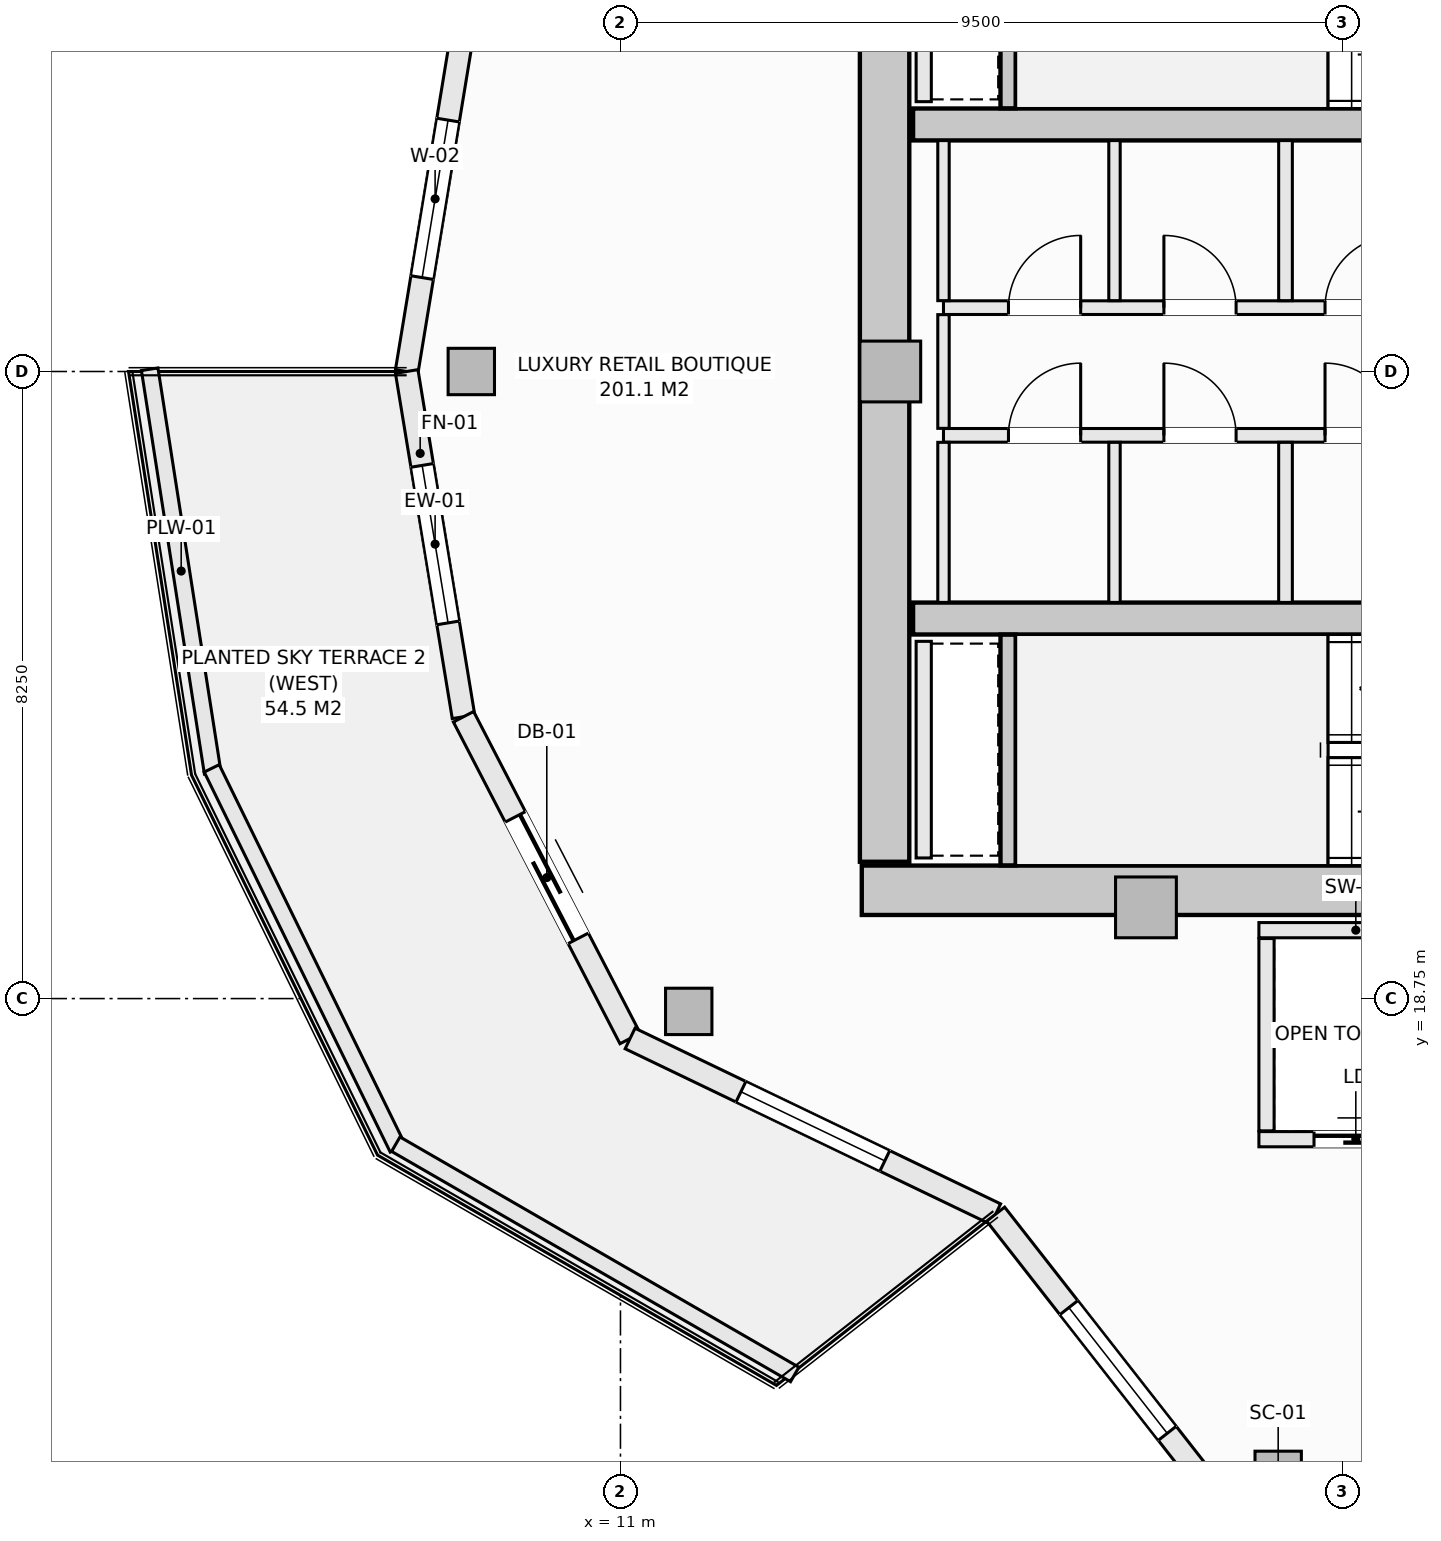
"""IFC4 building model, lengths in metres.
Left out: names, types, materials, properties, quantities, classifications, styles, units other than length and angle.
Written with IfcOpenShell. Run it as: python <this file> out.ifc"""

import sys

from ifc_helpers import new_model, si_unit, direction, frame, frame_2d, origin, origin_2d, place, context, subcontext, project, spatial, rectangle, hollow_rectangle, extrude, element, fill, save


model = new_model("IFC4")
c1 = context("Model", 3, precision=1e-05, world=origin(), true_north=direction((0.0, 1.0)))
c2 = subcontext(c1, "Body", "Model", "MODEL_VIEW")
j1 = project(units=[si_unit("LENGTHUNIT", "METRE"), si_unit("PLANEANGLEUNIT", "RADIAN")], contexts=[c1])
p1 = place(None, origin())
s1 = spatial("IfcSite", under=j1, at=p1, CompositionType="ELEMENT")
p2 = place(p1, origin())
s2 = spatial("IfcBuilding", under=s1, at=p2, CompositionType="ELEMENT")
p3 = place(p2, frame((0.0, 0.0, 173.3)))
s3 = spatial("IfcBuildingStorey", under=s2, at=p3, CompositionType="ELEMENT", Elevation=173.3)
p4 = place(p3, frame((14.175, 20.175, -0.27), z_axis=(0.0, 0.0, 1.0), x_axis=(1.0, 0.0, 0.0)))
e1 = element("IfcWall", 1, at=p4, inside=s3, PredefinedType="SHEAR", context=c2, shape_type="SweptSolid", body=[
    extrude(rectangle(XDim=13.65, YDim=0.65, at=frame_2d((6.825, 0.0))), origin(), (0.0, 0.0, 1.0), 3.4),
])
p5 = place(p3, frame((14.475, 20.55, -0.27), z_axis=(0.0, 0.0, 1.0), x_axis=(0.0, 1.0, 0.0)))
e2 = element("IfcWall", 2, at=p5, inside=s3, PredefinedType="SHEAR", context=c2, shape_type="SweptSolid", body=[
    extrude(rectangle(XDim=12.9, YDim=0.65, at=frame_2d((6.45, 0.0))), origin(), (0.0, 0.0, 1.0), 3.4),
])
for number, where, z_axis, x_axis in (
    (3, (14.85, 30.25, -0.27), (0.0, 0.0, 1.0), (1.0, 0.0, 0.0)),
    (4, (14.85, 23.75, -0.27), (0.0, 0.0, 1.0), (1.0, 0.0, 0.0)),
):
    element("IfcWall", number, at=place(p3, frame(where, z_axis=z_axis, x_axis=x_axis)), inside=s3, PredefinedType="SHEAR", context=c2, shape_type="SweptSolid", body=[
        extrude(rectangle(XDim=7.3, YDim=0.42, at=frame_2d((3.65, 0.0))), origin(), (0.0, 0.0, 1.0), 3.4),
    ])
for number, where, z_axis, x_axis in (
    (5, (9.038, 27.0, -0.27), (0.0, 0.0, 1.0), (1.0, 0.0, 0.0)),
    (6, (11.898, 18.581, -0.27), (0.0, 0.0, 1.0), (1.0, 0.0, 0.0)),
    (7, (19.654, 12.49, -0.27), (0.0, 0.0, 1.0), (1.0, 0.0, 0.0)),
):
    element("IfcColumn", number, at=place(p3, frame(where, z_axis=z_axis, x_axis=x_axis)), inside=s3, PredefinedType="COLUMN", context=c2, shape_type="SweptSolid", body=[
        extrude(hollow_rectangle(XDim=0.61, YDim=0.61, WallThickness=0.025, at=origin_2d()), origin(), (0.0, 0.0, 1.0), 3.4),
    ])
for number, where, z_axis, x_axis in (
    (8, (14.55, 27.0, -0.27), (0.0, 0.0, 1.0), (1.0, 0.0, 0.0)),
    (9, (17.914, 19.95, -0.27), (0.0, 0.0, 1.0), (1.0, 0.0, 0.0)),
):
    element("IfcColumn", number, at=place(p3, frame(where, z_axis=z_axis, x_axis=x_axis)), inside=s3, PredefinedType="PILASTER", context=c2, shape_type="SweptSolid", body=[
        extrude(rectangle(XDim=0.8, YDim=0.8, at=origin_2d()), origin(), (0.0, 0.0, 1.0), 3.4),
    ])
p6 = place(p3, frame((8.188, 27.0, 0.0), z_axis=(0.0, 0.0, 1.0), x_axis=(0.162394765401, 0.986725868806, 0.0)))
e10 = element("IfcWall", 10, at=p6, inside=s3, PredefinedType="SOLIDWALL", context=c2, shape_type="SweptSolid", body=[
    extrude(rectangle(XDim=4.603, YDim=0.3, at=frame_2d((2.302, 0.0))), origin(), (0.0, 0.0, 1.0), 2.653),
])
p7 = place(p6, frame((1.252, 0.0, 0.74)))
e11 = element("IfcOpeningElement", 11, at=p7, cuts=e10, PredefinedType="OPENING", context=c2, shape_type="SweptSolid", body=[
    extrude(rectangle(XDim=2.1, YDim=1.7, at=frame_2d((1.05, 0.85))), frame((0.0, 0.16, 0.0), z_axis=(0.0, -1.0, 0.0), x_axis=(1.0, 0.0, 0.0)), (0.0, 0.0, 1.0), 0.32),
])
p8 = place(p3, frame((8.188, 27.0, 0.0), z_axis=(0.0, 0.0, 1.0), x_axis=(0.162394765401, -0.986725868806, 0.0)))
e12 = element("IfcWall", 12, at=p8, inside=s3, PredefinedType="SOLIDWALL", context=c2, shape_type="SweptSolid", body=[
    extrude(rectangle(XDim=4.603, YDim=0.3, at=frame_2d((2.302, 0.0))), origin(), (0.0, 0.0, 1.0), 2.653),
])
p9 = place(p8, frame((1.252, 0.0, 0.74)))
e13 = element("IfcOpeningElement", 13, at=p9, cuts=e12, PredefinedType="OPENING", context=c2, shape_type="SweptSolid", body=[
    extrude(rectangle(XDim=2.1, YDim=1.7, at=frame_2d((1.05, 0.85))), frame((0.0, 0.16, 0.0), z_axis=(0.0, -1.0, 0.0), x_axis=(1.0, 0.0, 0.0)), (0.0, 0.0, 1.0), 0.32),
])
p10 = place(p3, frame((8.935, 22.458, 0.0), z_axis=(0.0, 0.0, 1.0), x_axis=(0.459810251451, -0.888017191647, 0.0)))
e14 = element("IfcWall", 14, at=p10, inside=s3, PredefinedType="SOLIDWALL", context=c2, shape_type="SweptSolid", body=[
    extrude(rectangle(XDim=4.766, YDim=0.3, at=frame_2d((2.383, 0.0))), origin(), (0.0, 0.0, 1.0), 2.653),
])
p11 = place(p10, frame((1.483, 0.0, 0.0)))
e15 = element("IfcOpeningElement", 15, at=p11, cuts=e14, PredefinedType="OPENING", context=c2, shape_type="SweptSolid", body=[
    extrude(rectangle(XDim=1.8, YDim=2.25, at=frame_2d((0.9, 1.125))), frame((0.0, 0.16, 0.0), z_axis=(0.0, -1.0, 0.0), x_axis=(1.0, 0.0, 0.0)), (0.0, 0.0, 1.0), 0.32),
])
p12 = place(p3, frame((11.127, 18.225, 0.0), z_axis=(0.0, 0.0, 1.0), x_axis=(0.901353070301, -0.433085029363, 0.0)))
e16 = element("IfcWall", 16, at=p12, inside=s3, PredefinedType="SOLIDWALL", context=c2, shape_type="SweptSolid", body=[
    extrude(rectangle(XDim=5.336, YDim=0.3, at=frame_2d((2.668, 0.0))), origin(), (0.0, 0.0, 1.0), 2.653),
])
p13 = place(p12, frame((1.618, 0.0, 0.74)))
e17 = element("IfcOpeningElement", 17, at=p13, cuts=e16, PredefinedType="OPENING", context=c2, shape_type="SweptSolid", body=[
    extrude(rectangle(XDim=2.1, YDim=1.7, at=frame_2d((1.05, 0.85))), frame((0.0, 0.16, 0.0), z_axis=(0.0, -1.0, 0.0), x_axis=(1.0, 0.0, 0.0)), (0.0, 0.0, 1.0), 0.32),
])
p14 = place(p3, frame((15.937, 15.914, 0.0), z_axis=(0.0, 0.0, 1.0), x_axis=(0.616429245738, -0.787410302828, 0.0)))
e18 = element("IfcWall", 18, at=p14, inside=s3, PredefinedType="SOLIDWALL", context=c2, shape_type="SweptSolid", body=[
    extrude(rectangle(XDim=5.223, YDim=0.3, at=frame_2d((2.612, 0.0))), origin(), (0.0, 0.0, 1.0), 2.653),
])
p15 = place(p14, frame((1.562, 0.0, 0.74)))
e19 = element("IfcOpeningElement", 19, at=p15, cuts=e18, PredefinedType="OPENING", context=c2, shape_type="SweptSolid", body=[
    extrude(rectangle(XDim=2.1, YDim=1.7, at=frame_2d((1.05, 0.85))), frame((0.0, 0.16, 0.0), z_axis=(0.0, -1.0, 0.0), x_axis=(1.0, 0.0, 0.0)), (0.0, 0.0, 1.0), 0.32),
])
p16 = place(p3, frame((4.806, 27.029, 0.0), z_axis=(0.0, 0.0, 1.0), x_axis=(0.154245214003, -0.988032597619, 0.0)))
e20 = element("IfcWall", 20, at=p16, inside=s3, PredefinedType="PARAPET", context=c2, shape_type="SweptSolid", body=[
    extrude(rectangle(XDim=5.374, YDim=0.22, at=frame_2d((2.687, 0.0))), origin(), (0.0, 0.0, 1.0), 0.52),
])
p17 = place(p3, frame((5.622, 21.779, 0.0), z_axis=(0.0, 0.0, 1.0), x_axis=(0.439637174641, -0.898175458735, 0.0)))
e21 = element("IfcWall", 21, at=p17, inside=s3, PredefinedType="PARAPET", context=c2, shape_type="SweptSolid", body=[
    extrude(rectangle(XDim=5.567, YDim=0.22, at=frame_2d((2.784, 0.0))), origin(), (0.0, 0.0, 1.0), 0.52),
])
p18 = place(p3, frame((8.044, 16.834, 0.0), z_axis=(0.0, 0.0, 1.0), x_axis=(0.866058128659, -0.499943314571, 0.0)))
e22 = element("IfcWall", 22, at=p18, inside=s3, PredefinedType="PARAPET", context=c2, shape_type="SweptSolid", body=[
    extrude(rectangle(XDim=6.06, YDim=0.22, at=frame_2d((3.03, 0.0))), origin(), (0.0, 0.0, 1.0), 0.52),
])
for number, where, z_axis, x_axis in (
    (23, (16.1, 30.462, -0.27), (0.0, 0.0, 1.0), (0.0, 1.0, 0.0)),
    (24, (16.1, 20.502, -0.27), (0.0, 0.0, 1.0), (0.0, 1.0, 0.0)),
):
    element("IfcWall", number, at=place(p3, frame(where, z_axis=z_axis, x_axis=x_axis)), inside=s3, PredefinedType="SHEAR", context=c2, shape_type="SweptSolid", body=[
        extrude(rectangle(XDim=3.036, YDim=0.2, at=frame_2d((1.518, 0.0))), origin(), (0.0, 0.0, 1.0), 3.4),
    ])
p19 = place(p3, frame((19.4, 19.65, 0.0), z_axis=(0.0, 0.0, 1.0), x_axis=(1.0, 0.0, 0.0)))
e25 = element("IfcWall", 25, at=p19, inside=s3, PredefinedType="SOLIDWALL", context=c2, shape_type="SweptSolid", body=[
    extrude(rectangle(XDim=2.55, YDim=0.2, at=frame_2d((1.275, 0.0))), origin(), (0.0, 0.0, 1.0), 3.13),
])
p20 = place(p3, frame((19.4, 16.9, 0.0), z_axis=(0.0, 0.0, 1.0), x_axis=(1.0, 0.0, 0.0)))
e26 = element("IfcWall", 26, at=p20, inside=s3, PredefinedType="SOLIDWALL", context=c2, shape_type="SweptSolid", body=[
    extrude(rectangle(XDim=2.55, YDim=0.2, at=frame_2d((1.275, 0.0))), origin(), (0.0, 0.0, 1.0), 3.13),
])
p21 = place(p20, frame((0.725, 0.0, 0.0)))
e27 = element("IfcOpeningElement", 27, at=p21, cuts=e26, PredefinedType="OPENING", context=c2, shape_type="SweptSolid", body=[
    extrude(rectangle(XDim=1.1, YDim=2.2, at=frame_2d((0.55, 1.1))), frame((0.0, 0.11, 0.0), z_axis=(0.0, -1.0, 0.0), x_axis=(1.0, 0.0, 0.0)), (0.0, 0.0, 1.0), 0.22),
])
p22 = place(p3, frame((19.5, 17.01, 0.0), z_axis=(0.0, 0.0, 1.0), x_axis=(0.0, 1.0, 0.0)))
e28 = element("IfcWall", 28, at=p22, inside=s3, PredefinedType="SOLIDWALL", context=c2, shape_type="SweptSolid", body=[
    extrude(rectangle(XDim=2.53, YDim=0.2, at=frame_2d((1.265, 0.0))), origin(), (0.0, 0.0, 1.0), 3.13),
])
for number, where, z_axis, x_axis in (
    (29, (14.99, 30.55, 0.0), (0.0, 0.0, 1.0), (0.0, 1.0, 0.0)),
    (30, (14.99, 20.6, 0.0), (0.0, 0.0, 1.0), (0.0, 1.0, 0.0)),
):
    element("IfcWall", number, at=place(p3, frame(where, z_axis=z_axis, x_axis=x_axis)), inside=s3, PredefinedType="SOLIDWALL", context=c2, shape_type="SweptSolid", body=[
        extrude(rectangle(XDim=2.85, YDim=0.2, at=frame_2d((1.425, 0.0))), origin(), (0.0, 0.0, 1.0), 3.13),
    ])
p23 = place(p3, frame((15.25, 27.84, 0.0), z_axis=(0.0, 0.0, 1.0), x_axis=(1.0, 0.0, 0.0)))
e31 = element("IfcWall", 31, at=p23, inside=s3, PredefinedType="SOLIDWALL", context=c2, shape_type="SweptSolid", body=[
    extrude(rectangle(XDim=6.9, YDim=0.18, at=frame_2d((3.45, 0.0))), origin(), (0.0, 0.0, 1.0), 3.13),
])
p24 = place(p23, frame((5.02, 0.0, 0.0)))
e32 = element("IfcOpeningElement", 32, at=p24, cuts=e31, PredefinedType="OPENING", context=c2, shape_type="SweptSolid", body=[
    extrude(rectangle(XDim=0.95, YDim=2.1, at=frame_2d((0.475, 1.05))), frame((0.0, 0.1, 0.0), z_axis=(0.0, -1.0, 0.0), x_axis=(1.0, 0.0, 0.0)), (0.0, 0.0, 1.0), 0.2),
])
p25 = place(p23, frame((0.855, 0.0, 0.0)))
e33 = element("IfcOpeningElement", 33, at=p25, cuts=e31, PredefinedType="OPENING", context=c2, shape_type="SweptSolid", body=[
    extrude(rectangle(XDim=0.95, YDim=2.1, at=frame_2d((0.475, 1.05))), frame((0.0, 0.1, 0.0), z_axis=(0.0, -1.0, 0.0), x_axis=(1.0, 0.0, 0.0)), (0.0, 0.0, 1.0), 0.2),
])
p26 = place(p23, frame((2.9, 0.0, 0.0)))
e34 = element("IfcOpeningElement", 34, at=p26, cuts=e31, PredefinedType="OPENING", context=c2, shape_type="SweptSolid", body=[
    extrude(rectangle(XDim=0.95, YDim=2.1, at=frame_2d((0.475, 1.05))), frame((0.0, 0.1, 0.0), z_axis=(0.0, -1.0, 0.0), x_axis=(1.0, 0.0, 0.0)), (0.0, 0.0, 1.0), 0.2),
])
p27 = place(p3, frame((15.25, 26.16, 0.0), z_axis=(0.0, 0.0, 1.0), x_axis=(1.0, 0.0, 0.0)))
e35 = element("IfcWall", 35, at=p27, inside=s3, PredefinedType="SOLIDWALL", context=c2, shape_type="SweptSolid", body=[
    extrude(rectangle(XDim=6.9, YDim=0.18, at=frame_2d((3.45, 0.0))), origin(), (0.0, 0.0, 1.0), 3.13),
])
p28 = place(p27, frame((5.02, 0.0, 0.0)))
e36 = element("IfcOpeningElement", 36, at=p28, cuts=e35, PredefinedType="OPENING", context=c2, shape_type="SweptSolid", body=[
    extrude(rectangle(XDim=0.95, YDim=2.1, at=frame_2d((0.475, 1.05))), frame((0.0, 0.1, 0.0), z_axis=(0.0, -1.0, 0.0), x_axis=(1.0, 0.0, 0.0)), (0.0, 0.0, 1.0), 0.2),
])
p29 = place(p27, frame((0.855, 0.0, 0.0)))
e37 = element("IfcOpeningElement", 37, at=p29, cuts=e35, PredefinedType="OPENING", context=c2, shape_type="SweptSolid", body=[
    extrude(rectangle(XDim=0.95, YDim=2.1, at=frame_2d((0.475, 1.05))), frame((0.0, 0.1, 0.0), z_axis=(0.0, -1.0, 0.0), x_axis=(1.0, 0.0, 0.0)), (0.0, 0.0, 1.0), 0.2),
])
p30 = place(p27, frame((2.9, 0.0, 0.0)))
e38 = element("IfcOpeningElement", 38, at=p30, cuts=e35, PredefinedType="OPENING", context=c2, shape_type="SweptSolid", body=[
    extrude(rectangle(XDim=0.95, YDim=2.1, at=frame_2d((0.475, 1.05))), frame((0.0, 0.1, 0.0), z_axis=(0.0, -1.0, 0.0), x_axis=(1.0, 0.0, 0.0)), (0.0, 0.0, 1.0), 0.2),
])
p31 = place(p3, frame((15.25, 23.962, 0.0), z_axis=(0.0, 0.0, 1.0), x_axis=(0.0, 1.0, 0.0)))
e39 = element("IfcWall", 39, at=p31, inside=s3, PredefinedType="PARTITIONING", context=c2, shape_type="SweptSolid", body=[
    extrude(rectangle(XDim=2.106, YDim=0.15, at=frame_2d((1.053, 0.0))), origin(), (0.0, 0.0, 1.0), 3.13),
])
p32 = place(p3, frame((15.25, 26.252, 0.0), z_axis=(0.0, 0.0, 1.0), x_axis=(0.0, 1.0, 0.0)))
e40 = element("IfcWall", 40, at=p32, inside=s3, PredefinedType="PARTITIONING", context=c2, shape_type="SweptSolid", body=[
    extrude(rectangle(XDim=1.496, YDim=0.15, at=frame_2d((0.748, 0.0))), origin(), (0.0, 0.0, 1.0), 3.13),
])
p33 = place(p3, frame((15.25, 27.932, 0.0), z_axis=(0.0, 0.0, 1.0), x_axis=(0.0, 1.0, 0.0)))
e41 = element("IfcWall", 41, at=p33, inside=s3, PredefinedType="PARTITIONING", context=c2, shape_type="SweptSolid", body=[
    extrude(rectangle(XDim=2.106, YDim=0.15, at=frame_2d((1.053, 0.0))), origin(), (0.0, 0.0, 1.0), 3.13),
])
for number, where, z_axis, x_axis in (
    (42, (19.75, 23.962, 0.0), (0.0, 0.0, 1.0), (0.0, 1.0, 0.0)),
    (43, (19.75, 27.932, 0.0), (0.0, 0.0, 1.0), (0.0, 1.0, 0.0)),
):
    element("IfcWall", number, at=place(p3, frame(where, z_axis=z_axis, x_axis=x_axis)), inside=s3, PredefinedType="SOLIDWALL", context=c2, shape_type="SweptSolid", body=[
        extrude(rectangle(XDim=2.106, YDim=0.18, at=frame_2d((1.053, 0.0))), origin(), (0.0, 0.0, 1.0), 3.13),
    ])
for number, where, z_axis, x_axis in (
    (44, (17.5, 23.962, 0.0), (0.0, 0.0, 1.0), (0.0, 1.0, 0.0)),
    (45, (17.5, 27.932, 0.0), (0.0, 0.0, 1.0), (0.0, 1.0, 0.0)),
):
    element("IfcWall", number, at=place(p3, frame(where, z_axis=z_axis, x_axis=x_axis)), inside=s3, PredefinedType="PARTITIONING", context=c2, shape_type="SweptSolid", body=[
        extrude(rectangle(XDim=2.106, YDim=0.15, at=frame_2d((1.053, 0.0))), origin(), (0.0, 0.0, 1.0), 3.13),
    ])
p34 = place(p7, origin())
e46 = element("IfcWindow", 46, at=p34, inside=s3, PartitioningType="SINGLE_PANEL", PredefinedType="WINDOW", context=c2, shape_type="SweptSolid", body=[
    extrude(rectangle(XDim=2.1, YDim=1.7, at=frame_2d((1.05, 0.85))), frame((0.0, 0.03, 0.0), z_axis=(0.0, -1.0, 0.0), x_axis=(1.0, 0.0, 0.0)), (0.0, 0.0, 1.0), 0.06),
])
fill(e11, e46)
p35 = place(p9, origin())
e47 = element("IfcWindow", 47, at=p35, inside=s3, PartitioningType="SINGLE_PANEL", PredefinedType="WINDOW", context=c2, shape_type="SweptSolid", body=[
    extrude(rectangle(XDim=2.1, YDim=1.7, at=frame_2d((1.05, 0.85))), frame((0.0, 0.03, 0.0), z_axis=(0.0, -1.0, 0.0), x_axis=(1.0, 0.0, 0.0)), (0.0, 0.0, 1.0), 0.06),
])
fill(e13, e47)
p36 = place(p11, frame((1.8, 0.0, 0.0), z_axis=(0.0, 0.0, 1.0), x_axis=(-1.0, 0.0, 0.0)))
e48 = element("IfcDoor", 48, at=p36, inside=s3, OperationType="SLIDING_TO_LEFT", PredefinedType="DOOR", context=c2, shape_type="SweptSolid", body=[
    extrude(rectangle(XDim=1.8, YDim=2.25, at=frame_2d((0.9, 1.125))), frame((0.0, 0.025, 0.0), z_axis=(0.0, -1.0, 0.0), x_axis=(1.0, 0.0, 0.0)), (0.0, 0.0, 1.0), 0.05),
])
fill(e15, e48)
p37 = place(p13, origin())
e49 = element("IfcWindow", 49, at=p37, inside=s3, PartitioningType="SINGLE_PANEL", PredefinedType="WINDOW", context=c2, shape_type="SweptSolid", body=[
    extrude(rectangle(XDim=2.1, YDim=1.7, at=frame_2d((1.05, 0.85))), frame((0.0, 0.03, 0.0), z_axis=(0.0, -1.0, 0.0), x_axis=(1.0, 0.0, 0.0)), (0.0, 0.0, 1.0), 0.06),
])
fill(e17, e49)
p38 = place(p15, origin())
e50 = element("IfcWindow", 50, at=p38, inside=s3, PartitioningType="SINGLE_PANEL", PredefinedType="WINDOW", context=c2, shape_type="SweptSolid", body=[
    extrude(rectangle(XDim=2.1, YDim=1.7, at=frame_2d((1.05, 0.85))), frame((0.0, 0.03, 0.0), z_axis=(0.0, -1.0, 0.0), x_axis=(1.0, 0.0, 0.0)), (0.0, 0.0, 1.0), 0.06),
])
fill(e19, e50)
p39 = place(p21, origin())
e51 = element("IfcDoor", 51, at=p39, inside=s3, OperationType="SLIDING_TO_LEFT", PredefinedType="DOOR", context=c2, shape_type="SweptSolid", body=[
    extrude(rectangle(XDim=1.1, YDim=2.2, at=frame_2d((0.55, 1.1))), frame((0.0, 0.025, 0.0), z_axis=(0.0, -1.0, 0.0), x_axis=(1.0, 0.0, 0.0)), (0.0, 0.0, 1.0), 0.05),
])
fill(e27, e51)
p40 = place(p24, origin())
e52 = element("IfcDoor", 52, at=p40, inside=s3, OperationType="SINGLE_SWING_RIGHT", PredefinedType="DOOR", context=c2, shape_type="SweptSolid", body=[
    extrude(rectangle(XDim=0.95, YDim=2.1, at=frame_2d((0.475, 1.05))), frame((0.0, 0.025, 0.0), z_axis=(0.0, -1.0, 0.0), x_axis=(1.0, 0.0, 0.0)), (0.0, 0.0, 1.0), 0.05),
])
fill(e32, e52)
p41 = place(p28, origin())
e53 = element("IfcDoor", 53, at=p41, inside=s3, OperationType="SINGLE_SWING_LEFT", PredefinedType="DOOR", context=c2, shape_type="SweptSolid", body=[
    extrude(rectangle(XDim=0.95, YDim=2.1, at=frame_2d((0.475, 1.05))), frame((0.0, 0.025, 0.0), z_axis=(0.0, -1.0, 0.0), x_axis=(1.0, 0.0, 0.0)), (0.0, 0.0, 1.0), 0.05),
])
fill(e36, e53)
p42 = place(p25, origin())
e54 = element("IfcDoor", 54, at=p42, inside=s3, OperationType="SINGLE_SWING_RIGHT", PredefinedType="DOOR", context=c2, shape_type="SweptSolid", body=[
    extrude(rectangle(XDim=0.95, YDim=2.1, at=frame_2d((0.475, 1.05))), frame((0.0, 0.025, 0.0), z_axis=(0.0, -1.0, 0.0), x_axis=(1.0, 0.0, 0.0)), (0.0, 0.0, 1.0), 0.05),
])
fill(e33, e54)
p43 = place(p26, origin())
e55 = element("IfcDoor", 55, at=p43, inside=s3, OperationType="SINGLE_SWING_LEFT", PredefinedType="DOOR", context=c2, shape_type="SweptSolid", body=[
    extrude(rectangle(XDim=0.95, YDim=2.1, at=frame_2d((0.475, 1.05))), frame((0.0, 0.025, 0.0), z_axis=(0.0, -1.0, 0.0), x_axis=(1.0, 0.0, 0.0)), (0.0, 0.0, 1.0), 0.05),
])
fill(e34, e55)
p44 = place(p29, origin())
e56 = element("IfcDoor", 56, at=p44, inside=s3, OperationType="SINGLE_SWING_RIGHT", PredefinedType="DOOR", context=c2, shape_type="SweptSolid", body=[
    extrude(rectangle(XDim=0.95, YDim=2.1, at=frame_2d((0.475, 1.05))), frame((0.0, 0.025, 0.0), z_axis=(0.0, -1.0, 0.0), x_axis=(1.0, 0.0, 0.0)), (0.0, 0.0, 1.0), 0.05),
])
fill(e37, e56)
p45 = place(p30, origin())
e57 = element("IfcDoor", 57, at=p45, inside=s3, OperationType="SINGLE_SWING_LEFT", PredefinedType="DOOR", context=c2, shape_type="SweptSolid", body=[
    extrude(rectangle(XDim=0.95, YDim=2.1, at=frame_2d((0.475, 1.05))), frame((0.0, 0.025, 0.0), z_axis=(0.0, -1.0, 0.0), x_axis=(1.0, 0.0, 0.0)), (0.0, 0.0, 1.0), 0.05),
])
fill(e38, e57)
save(model, sys.argv[1])
